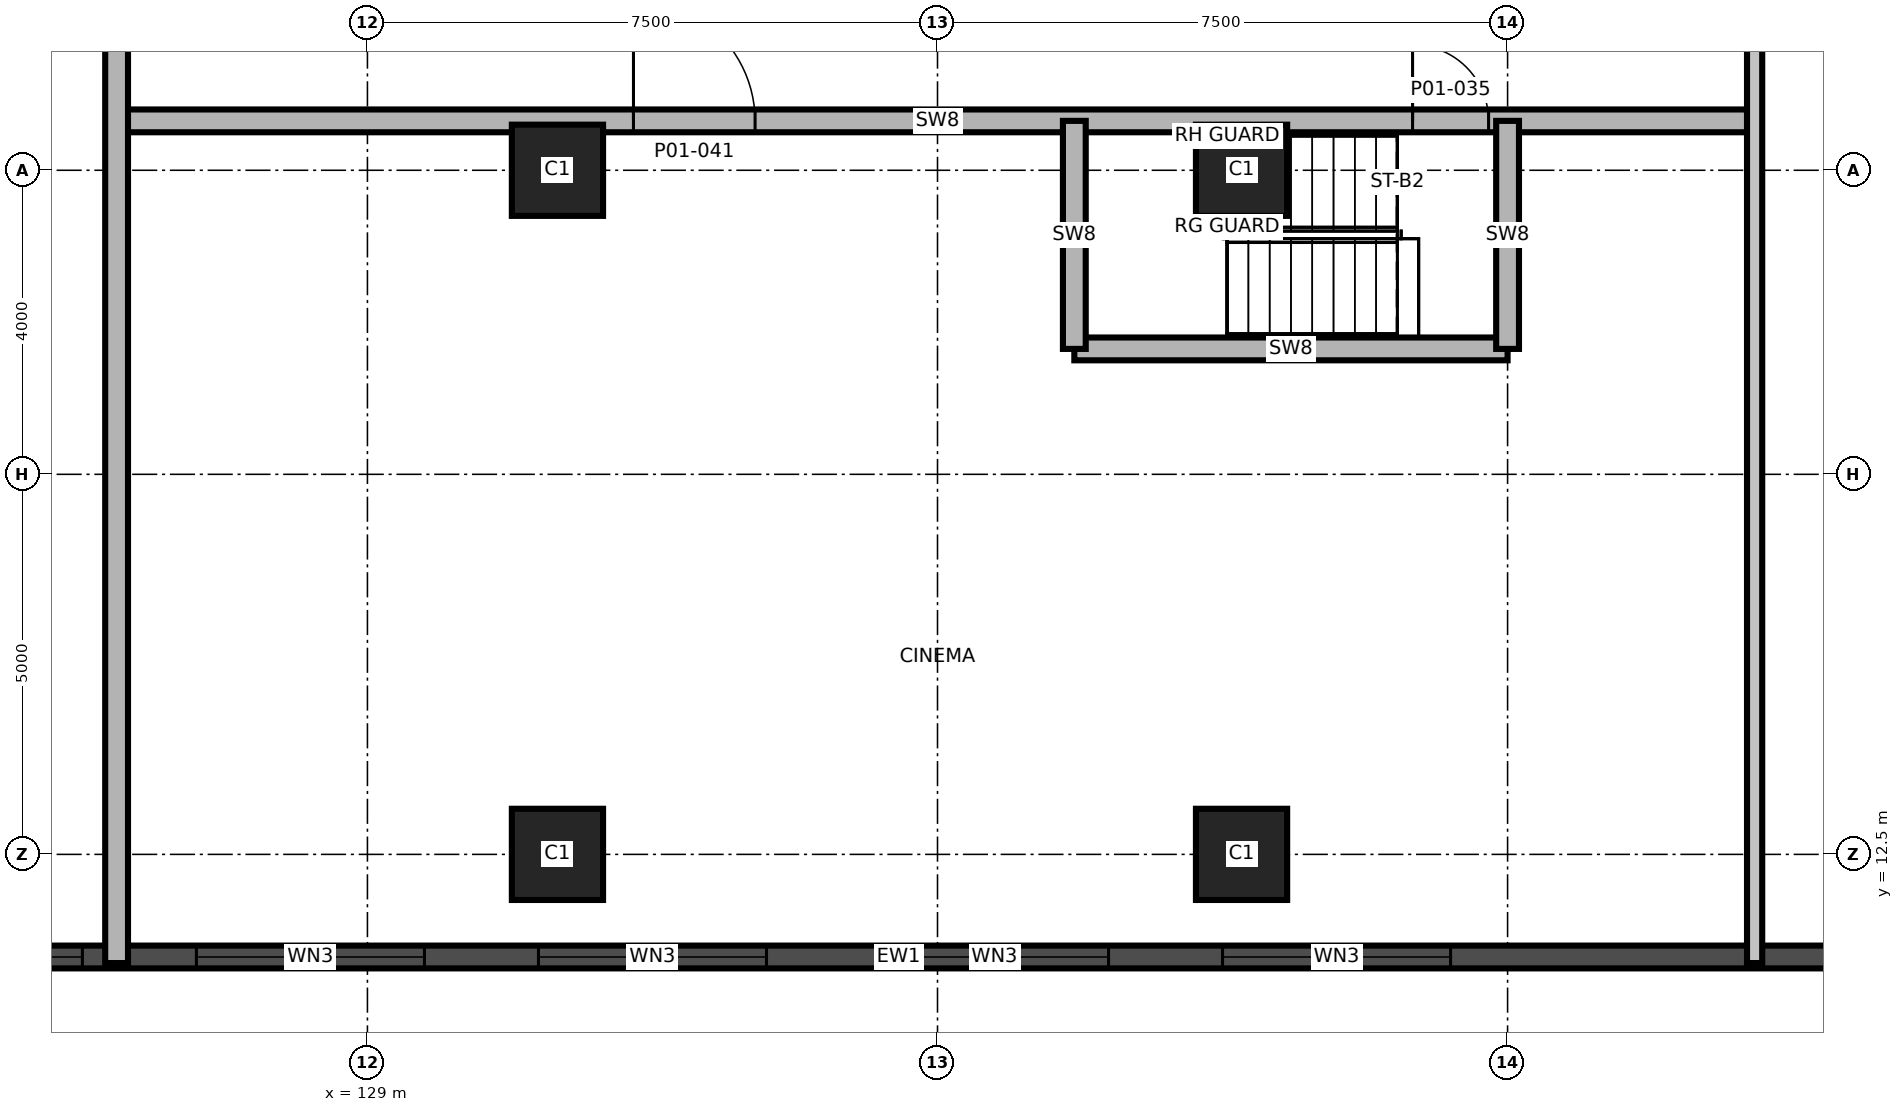
"""IFC4 building model, lengths in metres.
Left out: names, types, materials, properties, quantities, classifications, styles, units other than length and angle.
Written with IfcOpenShell. Run it as: python <this file> out.ifc"""

import sys

from ifc_helpers import new_model, si_unit, direction, frame, frame_2d, origin, origin_2d, place, context, subcontext, project, spatial, rectangle, extrude, element, fill, save


model = new_model("IFC4")
c1 = context("Model", 3, precision=1e-05, world=origin(), true_north=direction((0.0, 1.0)))
c2 = subcontext(c1, "Body", "Model", "MODEL_VIEW")
j1 = project(units=[si_unit("LENGTHUNIT", "METRE"), si_unit("PLANEANGLEUNIT", "RADIAN")], contexts=[c1])
p1 = place(None, origin())
s1 = spatial("IfcSite", under=j1, at=p1, CompositionType="ELEMENT")
p2 = place(p1, origin())
s2 = spatial("IfcBuilding", under=s1, at=p2, CompositionType="ELEMENT")
p3 = place(p2, frame((0.0, 0.0, 8.0)))
s3 = spatial("IfcBuildingStorey", under=s2, at=p3, CompositionType="ELEMENT", Elevation=8.0)
for number, where, z_axis, x_axis in (
    (1, (131.5, 12.5, 0.0), (0.0, 0.0, 1.0), (1.0, 0.0, 0.0)),
    (2, (140.5, 12.5, 0.0), (0.0, 0.0, 1.0), (1.0, 0.0, 0.0)),
    (3, (131.5, 21.5, 0.0), (0.0, 0.0, 1.0), (1.0, 0.0, 0.0)),
    (4, (140.5, 21.5, 0.0), (0.0, 0.0, 1.0), (1.0, 0.0, 0.0)),
):
    element("IfcColumn", number, at=place(p3, frame(where, z_axis=z_axis, x_axis=x_axis)), inside=s3, PredefinedType="COLUMN", context=c2, shape_type="SweptSolid", body=[
        extrude(rectangle(XDim=1.2, YDim=1.2, at=origin_2d()), origin(), (0.0, 0.0, 1.0), 5.5),
    ])
p4 = place(p3, frame((118.048, 11.15, 0.0), z_axis=(0.0, 0.0, 1.0), x_axis=(1.0, 0.0, 0.0)))
e5 = element("IfcWall", 5, at=p4, inside=s3, PredefinedType="SOLIDWALL", context=c2, shape_type="SweptSolid", body=[
    extrude(rectangle(XDim=35.88, YDim=0.3, at=frame_2d((17.94, 0.0))), origin(), (0.0, 0.0, 1.0), 5.2),
])
p5 = place(p4, frame((4.202, 0.0, 0.9)))
e6 = element("IfcOpeningElement", 6, at=p5, cuts=e5, PredefinedType="OPENING", context=c2, shape_type="SweptSolid", body=[
    extrude(rectangle(XDim=3.0, YDim=2.4, at=frame_2d((1.5, 1.2))), frame((0.0, 0.16, 0.0), z_axis=(0.0, -1.0, 0.0), x_axis=(1.0, 0.0, 0.0)), (0.0, 0.0, 1.0), 0.32),
])
p6 = place(p4, frame((8.702, 0.0, 0.9)))
e7 = element("IfcOpeningElement", 7, at=p6, cuts=e5, PredefinedType="OPENING", context=c2, shape_type="SweptSolid", body=[
    extrude(rectangle(XDim=3.0, YDim=2.4, at=frame_2d((1.5, 1.2))), frame((0.0, 0.16, 0.0), z_axis=(0.0, -1.0, 0.0), x_axis=(1.0, 0.0, 0.0)), (0.0, 0.0, 1.0), 0.32),
])
p7 = place(p4, frame((13.202, 0.0, 0.9)))
e8 = element("IfcOpeningElement", 8, at=p7, cuts=e5, PredefinedType="OPENING", context=c2, shape_type="SweptSolid", body=[
    extrude(rectangle(XDim=3.0, YDim=2.4, at=frame_2d((1.5, 1.2))), frame((0.0, 0.16, 0.0), z_axis=(0.0, -1.0, 0.0), x_axis=(1.0, 0.0, 0.0)), (0.0, 0.0, 1.0), 0.32),
])
p8 = place(p4, frame((17.702, 0.0, 0.9)))
e9 = element("IfcOpeningElement", 9, at=p8, cuts=e5, PredefinedType="OPENING", context=c2, shape_type="SweptSolid", body=[
    extrude(rectangle(XDim=3.0, YDim=2.4, at=frame_2d((1.5, 1.2))), frame((0.0, 0.16, 0.0), z_axis=(0.0, -1.0, 0.0), x_axis=(1.0, 0.0, 0.0)), (0.0, 0.0, 1.0), 0.32),
])
p9 = place(p4, frame((22.202, 0.0, 0.9)))
e10 = element("IfcOpeningElement", 10, at=p9, cuts=e5, PredefinedType="OPENING", context=c2, shape_type="SweptSolid", body=[
    extrude(rectangle(XDim=3.0, YDim=2.4, at=frame_2d((1.5, 1.2))), frame((0.0, 0.16, 0.0), z_axis=(0.0, -1.0, 0.0), x_axis=(1.0, 0.0, 0.0)), (0.0, 0.0, 1.0), 0.32),
])
p10 = place(p4, frame((31.726, 0.0, 0.9)))
e11 = element("IfcOpeningElement", 11, at=p10, cuts=e5, PredefinedType="OPENING", context=c2, shape_type="SweptSolid", body=[
    extrude(rectangle(XDim=3.0, YDim=2.4, at=frame_2d((1.5, 1.2))), frame((0.0, 0.16, 0.0), z_axis=(0.0, -1.0, 0.0), x_axis=(1.0, 0.0, 0.0)), (0.0, 0.0, 1.0), 0.32),
])
p11 = place(p3, frame((138.3, 19.15, 0.0), z_axis=(0.0, 0.0, 1.0), x_axis=(1.0, 0.0, 0.0)))
e12 = element("IfcWall", 12, at=p11, inside=s3, PredefinedType="SHEAR", context=c2, shape_type="SweptSolid", body=[
    extrude(rectangle(XDim=5.7, YDim=0.3, at=frame_2d((2.85, 0.0))), origin(), (0.0, 0.0, 1.0), 5.2),
])
p12 = place(p3, frame((125.75, 22.15, 0.0), z_axis=(0.0, 0.0, 1.0), x_axis=(1.0, 0.0, 0.0)))
e13 = element("IfcWall", 13, at=p12, inside=s3, PredefinedType="SHEAR", context=c2, shape_type="SweptSolid", body=[
    extrude(rectangle(XDim=21.5, YDim=0.3, at=frame_2d((10.75, 0.0))), origin(), (0.0, 0.0, 1.0), 5.2),
])
p13 = place(p12, frame((17.0, 0.0, 0.0)))
e14 = element("IfcOpeningElement", 14, at=p13, cuts=e13, PredefinedType="OPENING", context=c2, shape_type="SweptSolid", body=[
    extrude(rectangle(XDim=1.0, YDim=2.1, at=frame_2d((0.5, 1.05))), frame((0.0, 0.16, 0.0), z_axis=(0.0, -1.0, 0.0), x_axis=(1.0, 0.0, 0.0)), (0.0, 0.0, 1.0), 0.32),
])
p14 = place(p12, frame((6.75, 0.0, 0.0)))
e15 = element("IfcOpeningElement", 15, at=p14, cuts=e13, PredefinedType="OPENING", context=c2, shape_type="SweptSolid", body=[
    extrude(rectangle(XDim=1.6, YDim=2.1, at=frame_2d((0.8, 1.05))), frame((0.0, 0.16, 0.0), z_axis=(0.0, -1.0, 0.0), x_axis=(1.0, 0.0, 0.0)), (0.0, 0.0, 1.0), 0.32),
])
p15 = place(p3, frame((125.7, 11.07, 0.0), z_axis=(0.0, 0.0, 1.0), x_axis=(0.0, 1.0, 0.0)))
e16 = element("IfcWall", 16, at=p15, inside=s3, PredefinedType="SHEAR", context=c2, shape_type="SweptSolid", body=[
    extrude(rectangle(XDim=38.86, YDim=0.3, at=frame_2d((19.43, 0.0))), origin(), (0.0, 0.0, 1.0), 5.2),
])
p16 = place(p15, frame((14.194, 0.0, 0.0)))
e17 = element("IfcOpeningElement", 17, at=p16, cuts=e16, PredefinedType="OPENING", context=c2, shape_type="SweptSolid", body=[
    extrude(rectangle(XDim=1.0, YDim=2.1, at=frame_2d((0.5, 1.05))), frame((0.0, 0.16, 0.0), z_axis=(0.0, -1.0, 0.0), x_axis=(1.0, 0.0, 0.0)), (0.0, 0.0, 1.0), 0.32),
])
for number, where, z_axis, x_axis in (
    (18, (138.3, 19.15, 0.0), (0.0, 0.0, 1.0), (0.0, 1.0, 0.0)),
    (19, (144.0, 19.15, 0.0), (0.0, 0.0, 1.0), (0.0, 1.0, 0.0)),
):
    element("IfcWall", number, at=place(p3, frame(where, z_axis=z_axis, x_axis=x_axis)), inside=s3, PredefinedType="SHEAR", context=c2, shape_type="SweptSolid", body=[
        extrude(rectangle(XDim=3.0, YDim=0.3, at=frame_2d((1.5, 0.0))), origin(), (0.0, 0.0, 1.0), 5.2),
    ])
p17 = place(p3, frame((147.25, 11.07, 0.0), z_axis=(0.0, 0.0, 1.0), x_axis=(0.0, 1.0, 0.0)))
e20 = element("IfcWall", 20, at=p17, inside=s3, PredefinedType="PARTITIONING", context=c2, shape_type="SweptSolid", body=[
    extrude(rectangle(XDim=38.86, YDim=0.2, at=frame_2d((19.43, 0.0))), origin(), (0.0, 0.0, 1.0), 5.2),
])
p18 = place(p17, frame((18.18, 0.0, 0.0)))
e21 = element("IfcOpeningElement", 21, at=p18, cuts=e20, PredefinedType="OPENING", context=c2, shape_type="SweptSolid", body=[
    extrude(rectangle(XDim=1.5, YDim=2.1, at=frame_2d((0.75, 1.05))), frame((0.0, 0.11, 0.0), z_axis=(0.0, -1.0, 0.0), x_axis=(1.0, 0.0, 0.0)), (0.0, 0.0, 1.0), 0.22),
])
p19 = place(p5, origin())
e22 = element("IfcWindow", 22, at=p19, inside=s3, PartitioningType="SINGLE_PANEL", PredefinedType="WINDOW", context=c2, shape_type="SweptSolid", body=[
    extrude(rectangle(XDim=3.0, YDim=2.4, at=frame_2d((1.5, 1.2))), frame((0.0, 0.03, 0.0), z_axis=(0.0, -1.0, 0.0), x_axis=(1.0, 0.0, 0.0)), (0.0, 0.0, 1.0), 0.06),
])
fill(e6, e22)
p20 = place(p6, origin())
e23 = element("IfcWindow", 23, at=p20, inside=s3, PartitioningType="SINGLE_PANEL", PredefinedType="WINDOW", context=c2, shape_type="SweptSolid", body=[
    extrude(rectangle(XDim=3.0, YDim=2.4, at=frame_2d((1.5, 1.2))), frame((0.0, 0.03, 0.0), z_axis=(0.0, -1.0, 0.0), x_axis=(1.0, 0.0, 0.0)), (0.0, 0.0, 1.0), 0.06),
])
fill(e7, e23)
p21 = place(p7, origin())
e24 = element("IfcWindow", 24, at=p21, inside=s3, PartitioningType="SINGLE_PANEL", PredefinedType="WINDOW", context=c2, shape_type="SweptSolid", body=[
    extrude(rectangle(XDim=3.0, YDim=2.4, at=frame_2d((1.5, 1.2))), frame((0.0, 0.03, 0.0), z_axis=(0.0, -1.0, 0.0), x_axis=(1.0, 0.0, 0.0)), (0.0, 0.0, 1.0), 0.06),
])
fill(e8, e24)
p22 = place(p8, origin())
e25 = element("IfcWindow", 25, at=p22, inside=s3, PartitioningType="SINGLE_PANEL", PredefinedType="WINDOW", context=c2, shape_type="SweptSolid", body=[
    extrude(rectangle(XDim=3.0, YDim=2.4, at=frame_2d((1.5, 1.2))), frame((0.0, 0.03, 0.0), z_axis=(0.0, -1.0, 0.0), x_axis=(1.0, 0.0, 0.0)), (0.0, 0.0, 1.0), 0.06),
])
fill(e9, e25)
p23 = place(p9, origin())
e26 = element("IfcWindow", 26, at=p23, inside=s3, PartitioningType="SINGLE_PANEL", PredefinedType="WINDOW", context=c2, shape_type="SweptSolid", body=[
    extrude(rectangle(XDim=3.0, YDim=2.4, at=frame_2d((1.5, 1.2))), frame((0.0, 0.03, 0.0), z_axis=(0.0, -1.0, 0.0), x_axis=(1.0, 0.0, 0.0)), (0.0, 0.0, 1.0), 0.06),
])
fill(e10, e26)
p24 = place(p13, origin())
e27 = element("IfcDoor", 27, at=p24, inside=s3, OperationType="SINGLE_SWING_LEFT", PredefinedType="DOOR", context=c2, shape_type="SweptSolid", body=[
    extrude(rectangle(XDim=1.0, YDim=2.1, at=frame_2d((0.5, 1.05))), frame((0.0, 0.025, 0.0), z_axis=(0.0, -1.0, 0.0), x_axis=(1.0, 0.0, 0.0)), (0.0, 0.0, 1.0), 0.05),
])
fill(e14, e27)
p25 = place(p14, origin())
e28 = element("IfcDoor", 28, at=p25, inside=s3, OperationType="SINGLE_SWING_LEFT", PredefinedType="DOOR", context=c2, shape_type="SweptSolid", body=[
    extrude(rectangle(XDim=1.6, YDim=2.1, at=frame_2d((0.8, 1.05))), frame((0.0, 0.025, 0.0), z_axis=(0.0, -1.0, 0.0), x_axis=(1.0, 0.0, 0.0)), (0.0, 0.0, 1.0), 0.05),
])
fill(e15, e28)
save(model, sys.argv[1])
